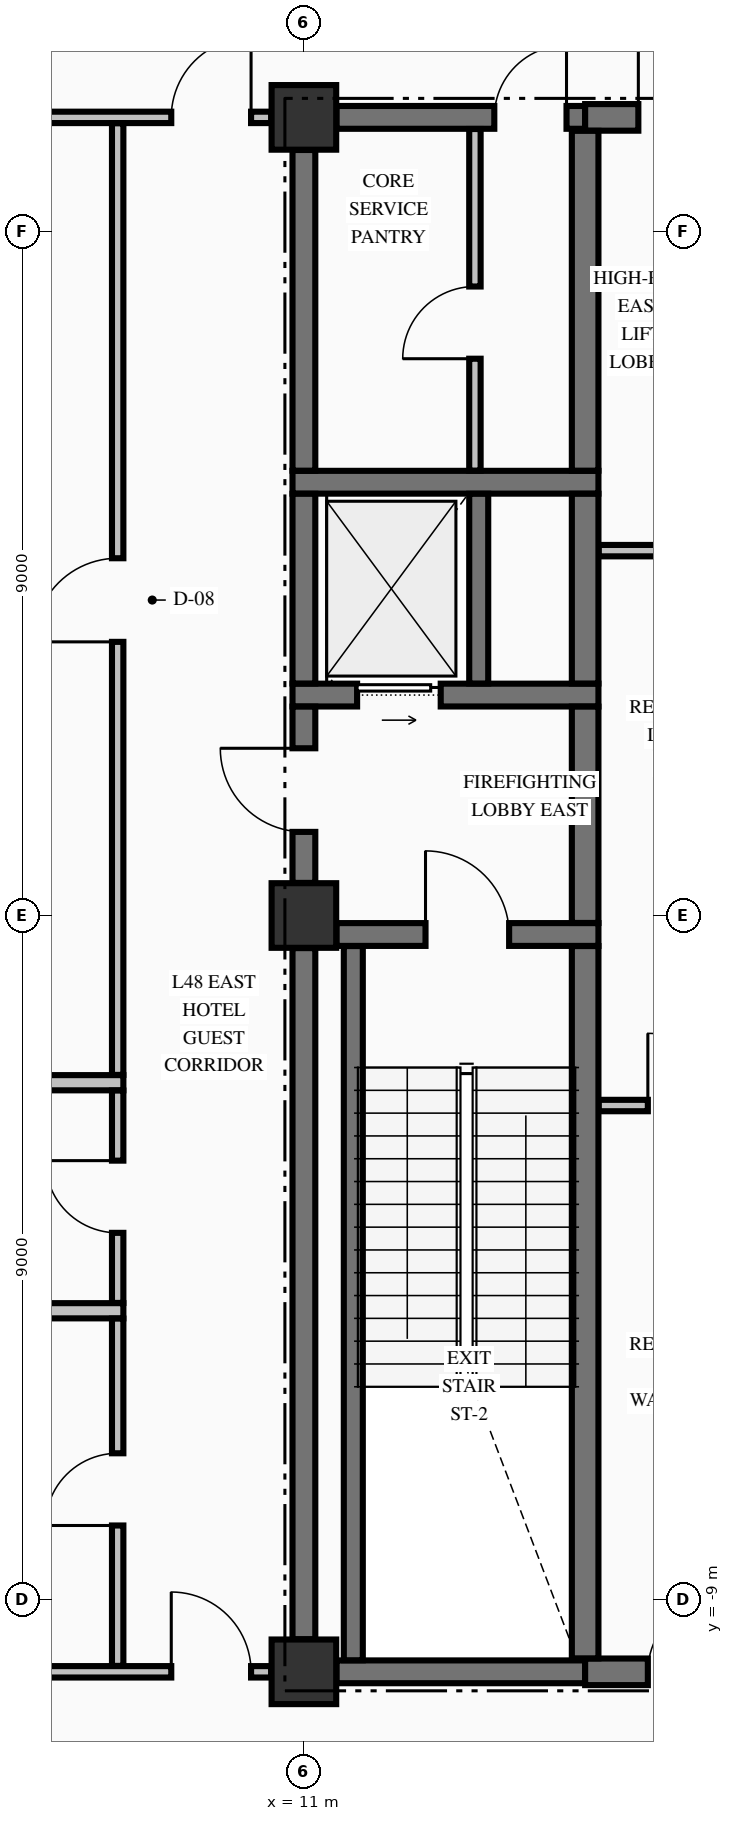
"""IFC4 building model, lengths in metres.
Left out: names, types, materials, properties, quantities, classifications, styles, units other than length and angle.
Written with IfcOpenShell. Run it as: python <this file> out.ifc"""

import sys

from ifc_helpers import new_model, si_unit, direction, frame, frame_2d, origin, origin_2d, place, context, subcontext, project, spatial, rectangle, extrude, element, fill, save


model = new_model("IFC4")
c1 = context("Model", 3, precision=1e-05, world=origin(), true_north=direction((0.0, 1.0)))
c2 = subcontext(c1, "Body", "Model", "MODEL_VIEW")
j1 = project(units=[si_unit("LENGTHUNIT", "METRE"), si_unit("PLANEANGLEUNIT", "RADIAN")], contexts=[c1])
p1 = place(None, origin())
s1 = spatial("IfcSite", under=j1, at=p1, CompositionType="ELEMENT")
p2 = place(p1, origin())
s2 = spatial("IfcBuilding", under=s1, at=p2, CompositionType="ELEMENT")
p3 = place(p2, frame((0.0, 0.0, 186.46)))
s3 = spatial("IfcBuildingStorey", under=s2, at=p3, CompositionType="ELEMENT", Elevation=186.46)
for number, where, z_axis, x_axis in (
    (1, (11.0, -9.95, -0.425), (0.0, 0.0, 1.0), (1.0, 0.0, 0.0)),
    (2, (11.0, 0.0, -0.425), (0.0, 0.0, 1.0), (1.0, 0.0, 0.0)),
    (3, (11.0, 10.5, -0.425), (0.0, 0.0, 1.0), (1.0, 0.0, 0.0)),
):
    element("IfcColumn", number, at=place(p3, frame(where, z_axis=z_axis, x_axis=x_axis)), inside=s3, PredefinedType="COLUMN", context=c2, shape_type="SweptSolid", body=[
        extrude(rectangle(XDim=0.85, YDim=0.85, at=origin_2d()), origin(), (0.0, 0.0, 1.0), 5.0),
    ])
p4 = place(p3, frame((11.429, -9.95, 0.0), z_axis=(0.0, 0.0, 1.0), x_axis=(1.0, 0.0, 0.0)))
e4 = element("IfcWall", 4, at=p4, inside=s3, PredefinedType="SHEAR", context=c2, shape_type="SweptSolid", body=[
    extrude(rectangle(XDim=3.271, YDim=0.3, at=frame_2d((1.635, 0.0))), origin(), (0.0, 0.0, 1.0), 4.575),
])
p5 = place(p3, frame((14.7, -9.95, 0.0), z_axis=(0.0, 0.0, 1.0), x_axis=(1.0, 0.0, 0.0)))
e5 = element("IfcWall", 5, at=p5, inside=s3, PredefinedType="SHEAR", context=c2, shape_type="SweptSolid", body=[
    extrude(rectangle(XDim=4.871, YDim=0.35, at=frame_2d((2.436, 0.0))), origin(), (0.0, 0.0, 1.0), 4.575),
])
p6 = place(p5, frame((0.825, 0.0, 0.0)))
e6 = element("IfcOpeningElement", 6, at=p6, cuts=e5, PredefinedType="OPENING", context=c2, shape_type="SweptSolid", body=[
    extrude(rectangle(XDim=0.95, YDim=2.15, at=frame_2d((0.475, 1.075))), frame((0.0, 0.185, 0.0), z_axis=(0.0, -1.0, 0.0), x_axis=(1.0, 0.0, 0.0)), (0.0, 0.0, 1.0), 0.37),
])
p7 = place(p5, frame((3.375, 0.0, 0.0)))
e7 = element("IfcOpeningElement", 7, at=p7, cuts=e5, PredefinedType="OPENING", context=c2, shape_type="SweptSolid", body=[
    extrude(rectangle(XDim=0.95, YDim=2.15, at=frame_2d((0.475, 1.075))), frame((0.0, 0.185, 0.0), z_axis=(0.0, -1.0, 0.0), x_axis=(1.0, 0.0, 0.0)), (0.0, 0.0, 1.0), 0.37),
])
p8 = place(p3, frame((11.429, -0.25, 0.0), z_axis=(0.0, 0.0, 1.0), x_axis=(1.0, 0.0, 0.0)))
e8 = element("IfcWall", 8, at=p8, inside=s3, PredefinedType="SHEAR", context=c2, shape_type="SweptSolid", body=[
    extrude(rectangle(XDim=3.446, YDim=0.3, at=frame_2d((1.723, 0.0))), origin(), (0.0, 0.0, 1.0), 4.575),
])
p9 = place(p8, frame((1.171, 0.0, 0.0)))
e9 = element("IfcOpeningElement", 9, at=p9, cuts=e8, PredefinedType="OPENING", context=c2, shape_type="SweptSolid", body=[
    extrude(rectangle(XDim=1.1, YDim=2.15, at=frame_2d((0.55, 1.075))), frame((0.0, 0.16, 0.0), z_axis=(0.0, -1.0, 0.0), x_axis=(1.0, 0.0, 0.0)), (0.0, 0.0, 1.0), 0.32),
])
p10 = place(p3, frame((10.85, 2.9, 0.0), z_axis=(0.0, 0.0, 1.0), x_axis=(1.0, 0.0, 0.0)))
e10 = element("IfcWall", 10, at=p10, inside=s3, PredefinedType="SHEAR", context=c2, shape_type="SweptSolid", body=[
    extrude(rectangle(XDim=4.025, YDim=0.3, at=frame_2d((2.012, 0.0))), origin(), (0.0, 0.0, 1.0), 4.575),
])
p11 = place(p10, frame((0.85, 0.0, 0.0)))
e11 = element("IfcOpeningElement", 11, at=p11, cuts=e10, PredefinedType="OPENING", context=c2, shape_type="SweptSolid", body=[
    extrude(rectangle(XDim=1.1, YDim=2.2, at=frame_2d((0.55, 1.1))), frame((0.0, 0.16, 0.0), z_axis=(0.0, -1.0, 0.0), x_axis=(1.0, 0.0, 0.0)), (0.0, 0.0, 1.0), 0.32),
])
p12 = place(p3, frame((10.85, 5.7, 0.0), z_axis=(0.0, 0.0, 1.0), x_axis=(1.0, 0.0, 0.0)))
e12 = element("IfcWall", 12, at=p12, inside=s3, PredefinedType="SHEAR", context=c2, shape_type="SweptSolid", body=[
    extrude(rectangle(XDim=4.025, YDim=0.3, at=frame_2d((2.012, 0.0))), origin(), (0.0, 0.0, 1.0), 4.575),
])
p13 = place(p3, frame((11.429, 10.5, 0.0), z_axis=(0.0, 0.0, 1.0), x_axis=(1.0, 0.0, 0.0)))
e13 = element("IfcWall", 13, at=p13, inside=s3, PredefinedType="SHEAR", context=c2, shape_type="SweptSolid", body=[
    extrude(rectangle(XDim=3.271, YDim=0.3, at=frame_2d((1.635, 0.0))), origin(), (0.0, 0.0, 1.0), 4.575),
])
p14 = place(p13, frame((2.076, 0.0, 0.0)))
e14 = element("IfcOpeningElement", 14, at=p14, cuts=e13, PredefinedType="OPENING", context=c2, shape_type="SweptSolid", body=[
    extrude(rectangle(XDim=0.95, YDim=2.15, at=frame_2d((0.475, 1.075))), frame((0.0, 0.16, 0.0), z_axis=(0.0, -1.0, 0.0), x_axis=(1.0, 0.0, 0.0)), (0.0, 0.0, 1.0), 0.32),
])
p15 = place(p3, frame((14.7, 10.5, 0.0), z_axis=(0.0, 0.0, 1.0), x_axis=(1.0, 0.0, 0.0)))
e15 = element("IfcWall", 15, at=p15, inside=s3, PredefinedType="SHEAR", context=c2, shape_type="SweptSolid", body=[
    extrude(rectangle(XDim=4.871, YDim=0.35, at=frame_2d((2.436, 0.0))), origin(), (0.0, 0.0, 1.0), 4.575),
])
p16 = place(p15, frame((0.7, 0.0, 0.0)))
e16 = element("IfcOpeningElement", 16, at=p16, cuts=e15, PredefinedType="OPENING", context=c2, shape_type="SweptSolid", body=[
    extrude(rectangle(XDim=1.1, YDim=2.15, at=frame_2d((0.55, 1.075))), frame((0.0, 0.185, 0.0), z_axis=(0.0, -1.0, 0.0), x_axis=(1.0, 0.0, 0.0)), (0.0, 0.0, 1.0), 0.37),
])
p17 = place(p3, frame((-10.569, -9.95, 0.0), z_axis=(0.0, 0.0, 1.0), x_axis=(1.0, 0.0, 0.0)))
e17 = element("IfcWall", 17, at=p17, inside=s3, PredefinedType="PARTITIONING", context=c2, shape_type="SweptSolid", body=[
    extrude(rectangle(XDim=21.138, YDim=0.15, at=frame_2d((10.569, 0.0))), origin(), (0.0, 0.0, 1.0), 4.575),
])
p18 = place(p17, frame((0.264, 0.0, 0.0)))
e18 = element("IfcOpeningElement", 18, at=p18, cuts=e17, PredefinedType="OPENING", context=c2, shape_type="SweptSolid", body=[
    extrude(rectangle(XDim=1.05, YDim=2.15, at=frame_2d((0.525, 1.075))), frame((0.0, 0.085, 0.0), z_axis=(0.0, -1.0, 0.0), x_axis=(1.0, 0.0, 0.0)), (0.0, 0.0, 1.0), 0.17),
])
p19 = place(p17, frame((19.824, 0.0, 0.0)))
e19 = element("IfcOpeningElement", 19, at=p19, cuts=e17, PredefinedType="OPENING", context=c2, shape_type="SweptSolid", body=[
    extrude(rectangle(XDim=1.05, YDim=2.15, at=frame_2d((0.525, 1.075))), frame((0.0, 0.085, 0.0), z_axis=(0.0, -1.0, 0.0), x_axis=(1.0, 0.0, 0.0)), (0.0, 0.0, 1.0), 0.17),
])
p20 = place(p17, frame((12.874, 0.0, 0.0)))
e20 = element("IfcOpeningElement", 20, at=p20, cuts=e17, PredefinedType="OPENING", context=c2, shape_type="SweptSolid", body=[
    extrude(rectangle(XDim=0.95, YDim=2.15, at=frame_2d((0.475, 1.075))), frame((0.0, 0.085, 0.0), z_axis=(0.0, -1.0, 0.0), x_axis=(1.0, 0.0, 0.0)), (0.0, 0.0, 1.0), 0.17),
])
p21 = place(p3, frame((-0.1, -5.2, 0.0), z_axis=(0.0, 0.0, 1.0), x_axis=(1.0, 0.0, 0.0)))
e21 = element("IfcWall", 21, at=p21, inside=s3, PredefinedType="PARTITIONING", context=c2, shape_type="SweptSolid", body=[
    extrude(rectangle(XDim=8.725, YDim=0.2, at=frame_2d((4.363, 0.0))), origin(), (0.0, 0.0, 1.0), 4.575),
])
p22 = place(p3, frame((14.878, -2.5, 0.0), z_axis=(0.0, 0.0, 1.0), x_axis=(1.0, 0.0, 0.0)))
e22 = element("IfcWall", 22, at=p22, inside=s3, PredefinedType="PARTITIONING", context=c2, shape_type="SweptSolid", body=[
    extrude(rectangle(XDim=4.944, YDim=0.15, at=frame_2d((2.472, 0.0))), origin(), (0.0, 0.0, 1.0), 4.575),
])
p23 = place(p22, frame((0.647, 0.0, 0.0)))
e23 = element("IfcOpeningElement", 23, at=p23, cuts=e22, PredefinedType="OPENING", context=c2, shape_type="SweptSolid", body=[
    extrude(rectangle(XDim=0.95, YDim=2.15, at=frame_2d((0.475, 1.075))), frame((0.0, 0.085, 0.0), z_axis=(0.0, -1.0, 0.0), x_axis=(1.0, 0.0, 0.0)), (0.0, 0.0, 1.0), 0.17),
])
p24 = place(p22, frame((3.197, 0.0, 0.0)))
e24 = element("IfcOpeningElement", 24, at=p24, cuts=e22, PredefinedType="OPENING", context=c2, shape_type="SweptSolid", body=[
    extrude(rectangle(XDim=0.95, YDim=2.15, at=frame_2d((0.475, 1.075))), frame((0.0, 0.085, 0.0), z_axis=(0.0, -1.0, 0.0), x_axis=(1.0, 0.0, 0.0)), (0.0, 0.0, 1.0), 0.17),
])
p25 = place(p3, frame((-0.1, -2.2, 0.0), z_axis=(0.0, 0.0, 1.0), x_axis=(1.0, 0.0, 0.0)))
e25 = element("IfcWall", 25, at=p25, inside=s3, PredefinedType="PARTITIONING", context=c2, shape_type="SweptSolid", body=[
    extrude(rectangle(XDim=8.725, YDim=0.2, at=frame_2d((4.363, 0.0))), origin(), (0.0, 0.0, 1.0), 4.575),
])
p26 = place(p3, frame((14.878, 4.8, 0.0), z_axis=(0.0, 0.0, 1.0), x_axis=(1.0, 0.0, 0.0)))
e26 = element("IfcWall", 26, at=p26, inside=s3, PredefinedType="PARTITIONING", context=c2, shape_type="SweptSolid", body=[
    extrude(rectangle(XDim=4.944, YDim=0.15, at=frame_2d((2.472, 0.0))), origin(), (0.0, 0.0, 1.0), 4.575),
])
p27 = place(p3, frame((-10.569, 10.5, 0.0), z_axis=(0.0, 0.0, 1.0), x_axis=(1.0, 0.0, 0.0)))
e27 = element("IfcWall", 27, at=p27, inside=s3, PredefinedType="PARTITIONING", context=c2, shape_type="SweptSolid", body=[
    extrude(rectangle(XDim=21.138, YDim=0.15, at=frame_2d((10.569, 0.0))), origin(), (0.0, 0.0, 1.0), 4.575),
])
p28 = place(p27, frame((0.264, 0.0, 0.0)))
e28 = element("IfcOpeningElement", 28, at=p28, cuts=e27, PredefinedType="OPENING", context=c2, shape_type="SweptSolid", body=[
    extrude(rectangle(XDim=1.05, YDim=2.15, at=frame_2d((0.525, 1.075))), frame((0.0, 0.085, 0.0), z_axis=(0.0, -1.0, 0.0), x_axis=(1.0, 0.0, 0.0)), (0.0, 0.0, 1.0), 0.17),
])
p29 = place(p27, frame((19.824, 0.0, 0.0)))
e29 = element("IfcOpeningElement", 29, at=p29, cuts=e27, PredefinedType="OPENING", context=c2, shape_type="SweptSolid", body=[
    extrude(rectangle(XDim=1.05, YDim=2.15, at=frame_2d((0.525, 1.075))), frame((0.0, 0.085, 0.0), z_axis=(0.0, -1.0, 0.0), x_axis=(1.0, 0.0, 0.0)), (0.0, 0.0, 1.0), 0.17),
])
p30 = place(p3, frame((11.0, -9.521, 0.0), z_axis=(0.0, 0.0, 1.0), x_axis=(0.0, 1.0, 0.0)))
e30 = element("IfcWall", 30, at=p30, inside=s3, PredefinedType="SHEAR", context=c2, shape_type="SweptSolid", body=[
    extrude(rectangle(XDim=9.092, YDim=0.3, at=frame_2d((4.546, 0.0))), origin(), (0.0, 0.0, 1.0), 4.575),
])
p31 = place(p3, frame((11.0, 0.429, 0.0), z_axis=(0.0, 0.0, 1.0), x_axis=(0.0, 1.0, 0.0)))
e31 = element("IfcWall", 31, at=p31, inside=s3, PredefinedType="SHEAR", context=c2, shape_type="SweptSolid", body=[
    extrude(rectangle(XDim=2.319, YDim=0.3, at=frame_2d((1.16, 0.0))), origin(), (0.0, 0.0, 1.0), 4.575),
])
p32 = place(p31, frame((0.671, 0.0, 0.0)))
e32 = element("IfcOpeningElement", 32, at=p32, cuts=e31, PredefinedType="OPENING", context=c2, shape_type="SweptSolid", body=[
    extrude(rectangle(XDim=1.1, YDim=2.15, at=frame_2d((0.55, 1.075))), frame((0.0, 0.16, 0.0), z_axis=(0.0, -1.0, 0.0), x_axis=(1.0, 0.0, 0.0)), (0.0, 0.0, 1.0), 0.32),
])
p33 = place(p3, frame((11.0, 3.052, 0.0), z_axis=(0.0, 0.0, 1.0), x_axis=(0.0, 1.0, 0.0)))
e33 = element("IfcWall", 33, at=p33, inside=s3, PredefinedType="SHEAR", context=c2, shape_type="SweptSolid", body=[
    extrude(rectangle(XDim=2.496, YDim=0.3, at=frame_2d((1.248, 0.0))), origin(), (0.0, 0.0, 1.0), 4.575),
])
p34 = place(p3, frame((11.0, 5.852, 0.0), z_axis=(0.0, 0.0, 1.0), x_axis=(0.0, 1.0, 0.0)))
e34 = element("IfcWall", 34, at=p34, inside=s3, PredefinedType="SHEAR", context=c2, shape_type="SweptSolid", body=[
    extrude(rectangle(XDim=4.219, YDim=0.3, at=frame_2d((2.109, 0.0))), origin(), (0.0, 0.0, 1.0), 4.575),
])
p35 = place(p3, frame((11.65, -9.798, 0.0), z_axis=(0.0, 0.0, 1.0), x_axis=(0.0, 1.0, 0.0)))
e35 = element("IfcWall", 35, at=p35, inside=s3, PredefinedType="SOLIDWALL", context=c2, shape_type="SweptSolid", body=[
    extrude(rectangle(XDim=9.396, YDim=0.25, at=frame_2d((4.698, 0.0))), origin(), (0.0, 0.0, 1.0), 4.575),
])
p36 = place(p3, frame((13.3, 3.052, 0.0), z_axis=(0.0, 0.0, 1.0), x_axis=(0.0, 1.0, 0.0)))
e36 = element("IfcWall", 36, at=p36, inside=s3, PredefinedType="SOLIDWALL", context=c2, shape_type="SweptSolid", body=[
    extrude(rectangle(XDim=2.496, YDim=0.25, at=frame_2d((1.248, 0.0))), origin(), (0.0, 0.0, 1.0), 4.575),
])
p37 = place(p3, frame((14.7, -9.773, 0.0), z_axis=(0.0, 0.0, 1.0), x_axis=(0.0, 1.0, 0.0)))
e37 = element("IfcWall", 37, at=p37, inside=s3, PredefinedType="SHEAR", context=c2, shape_type="SweptSolid", body=[
    extrude(rectangle(XDim=9.371, YDim=0.35, at=frame_2d((4.686, 0.0))), origin(), (0.0, 0.0, 1.0), 4.575),
])
p38 = place(p3, frame((14.7, -0.098, 0.0), z_axis=(0.0, 0.0, 1.0), x_axis=(0.0, 1.0, 0.0)))
e38 = element("IfcWall", 38, at=p38, inside=s3, PredefinedType="SHEAR", context=c2, shape_type="SweptSolid", body=[
    extrude(rectangle(XDim=2.846, YDim=0.35, at=frame_2d((1.423, 0.0))), origin(), (0.0, 0.0, 1.0), 4.575),
])
p39 = place(p3, frame((14.7, 3.052, 0.0), z_axis=(0.0, 0.0, 1.0), x_axis=(0.0, 1.0, 0.0)))
e39 = element("IfcWall", 39, at=p39, inside=s3, PredefinedType="SHEAR", context=c2, shape_type="SweptSolid", body=[
    extrude(rectangle(XDim=2.496, YDim=0.35, at=frame_2d((1.248, 0.0))), origin(), (0.0, 0.0, 1.0), 4.575),
])
p40 = place(p3, frame((14.7, 5.852, 0.0), z_axis=(0.0, 0.0, 1.0), x_axis=(0.0, 1.0, 0.0)))
e40 = element("IfcWall", 40, at=p40, inside=s3, PredefinedType="SHEAR", context=c2, shape_type="SweptSolid", body=[
    extrude(rectangle(XDim=4.471, YDim=0.35, at=frame_2d((2.235, 0.0))), origin(), (0.0, 0.0, 1.0), 4.575),
])
p41 = place(p3, frame((8.55, -9.872, 0.0), z_axis=(0.0, 0.0, 1.0), x_axis=(0.0, 1.0, 0.0)))
e41 = element("IfcWall", 41, at=p41, inside=s3, PredefinedType="PARTITIONING", context=c2, shape_type="SweptSolid", body=[
    extrude(rectangle(XDim=4.569, YDim=0.15, at=frame_2d((2.285, 0.0))), origin(), (0.0, 0.0, 1.0), 4.575),
])
p42 = place(p41, frame((1.847, 0.0, 0.0)))
e42 = element("IfcOpeningElement", 42, at=p42, cuts=e41, PredefinedType="OPENING", context=c2, shape_type="SweptSolid", body=[
    extrude(rectangle(XDim=0.95, YDim=2.15, at=frame_2d((0.475, 1.075))), frame((0.0, 0.085, 0.0), z_axis=(0.0, -1.0, 0.0), x_axis=(1.0, 0.0, 0.0)), (0.0, 0.0, 1.0), 0.17),
])
p43 = place(p3, frame((8.55, -5.097, 0.0), z_axis=(0.0, 0.0, 1.0), x_axis=(0.0, 1.0, 0.0)))
e43 = element("IfcWall", 43, at=p43, inside=s3, PredefinedType="PARTITIONING", context=c2, shape_type="SweptSolid", body=[
    extrude(rectangle(XDim=2.794, YDim=0.15, at=frame_2d((1.397, 0.0))), origin(), (0.0, 0.0, 1.0), 4.575),
])
p44 = place(p43, frame((0.922, 0.0, 0.0)))
e44 = element("IfcOpeningElement", 44, at=p44, cuts=e43, PredefinedType="OPENING", context=c2, shape_type="SweptSolid", body=[
    extrude(rectangle(XDim=0.95, YDim=2.15, at=frame_2d((0.475, 1.075))), frame((0.0, 0.085, 0.0), z_axis=(0.0, -1.0, 0.0), x_axis=(1.0, 0.0, 0.0)), (0.0, 0.0, 1.0), 0.17),
])
p45 = place(p3, frame((8.55, -2.097, 0.0), z_axis=(0.0, 0.0, 1.0), x_axis=(0.0, 1.0, 0.0)))
e45 = element("IfcWall", 45, at=p45, inside=s3, PredefinedType="PARTITIONING", context=c2, shape_type="SweptSolid", body=[
    extrude(rectangle(XDim=12.519, YDim=0.15, at=frame_2d((6.26, 0.0))), origin(), (0.0, 0.0, 1.0), 4.575),
])
p46 = place(p45, frame((5.697, 0.0, 0.0)))
e46 = element("IfcOpeningElement", 46, at=p46, cuts=e45, PredefinedType="OPENING", context=c2, shape_type="SweptSolid", body=[
    extrude(rectangle(XDim=1.1, YDim=2.15, at=frame_2d((0.55, 1.075))), frame((0.0, 0.085, 0.0), z_axis=(0.0, -1.0, 0.0), x_axis=(1.0, 0.0, 0.0)), (0.0, 0.0, 1.0), 0.17),
])
p47 = place(p3, frame((13.25, 5.853, 0.0), z_axis=(0.0, 0.0, 1.0), x_axis=(0.0, 1.0, 0.0)))
e47 = element("IfcWall", 47, at=p47, inside=s3, PredefinedType="PARTITIONING", context=c2, shape_type="SweptSolid", body=[
    extrude(rectangle(XDim=4.494, YDim=0.15, at=frame_2d((2.247, 0.0))), origin(), (0.0, 0.0, 1.0), 4.575),
])
p48 = place(p47, frame((1.472, 0.0, 0.0)))
e48 = element("IfcOpeningElement", 48, at=p48, cuts=e47, PredefinedType="OPENING", context=c2, shape_type="SweptSolid", body=[
    extrude(rectangle(XDim=0.95, YDim=2.15, at=frame_2d((0.475, 1.075))), frame((0.0, 0.085, 0.0), z_axis=(0.0, -1.0, 0.0), x_axis=(1.0, 0.0, 0.0)), (0.0, 0.0, 1.0), 0.17),
])
p49 = place(p9, origin())
e49 = element("IfcDoor", 49, at=p49, inside=s3, OperationType="SINGLE_SWING_LEFT", PredefinedType="DOOR", context=c2, shape_type="SweptSolid", body=[
    extrude(rectangle(XDim=1.1, YDim=2.15, at=frame_2d((0.55, 1.075))), frame((0.0, 0.025, 0.0), z_axis=(0.0, -1.0, 0.0), x_axis=(1.0, 0.0, 0.0)), (0.0, 0.0, 1.0), 0.05),
])
fill(e9, e49)
p50 = place(p32, origin())
e50 = element("IfcDoor", 50, at=p50, inside=s3, OperationType="SINGLE_SWING_RIGHT", PredefinedType="DOOR", context=c2, shape_type="SweptSolid", body=[
    extrude(rectangle(XDim=1.1, YDim=2.15, at=frame_2d((0.55, 1.075))), frame((0.0, 0.025, 0.0), z_axis=(0.0, -1.0, 0.0), x_axis=(1.0, 0.0, 0.0)), (0.0, 0.0, 1.0), 0.05),
])
fill(e32, e50)
p51 = place(p11, origin())
e51 = element("IfcDoor", 51, at=p51, inside=s3, OperationType="SLIDING_TO_RIGHT", PredefinedType="DOOR", context=c2, shape_type="SweptSolid", body=[
    extrude(rectangle(XDim=1.1, YDim=2.2, at=frame_2d((0.55, 1.1))), frame((0.0, 0.025, 0.0), z_axis=(0.0, -1.0, 0.0), x_axis=(1.0, 0.0, 0.0)), (0.0, 0.0, 1.0), 0.05),
])
fill(e11, e51)
p52 = place(p14, origin())
e52 = element("IfcDoor", 52, at=p52, inside=s3, OperationType="SINGLE_SWING_RIGHT", PredefinedType="DOOR", context=c2, shape_type="SweptSolid", body=[
    extrude(rectangle(XDim=0.95, YDim=2.15, at=frame_2d((0.475, 1.075))), frame((0.0, 0.025, 0.0), z_axis=(0.0, -1.0, 0.0), x_axis=(1.0, 0.0, 0.0)), (0.0, 0.0, 1.0), 0.05),
])
fill(e14, e52)
p53 = place(p48, origin())
e53 = element("IfcDoor", 53, at=p53, inside=s3, OperationType="SINGLE_SWING_LEFT", PredefinedType="DOOR", context=c2, shape_type="SweptSolid", body=[
    extrude(rectangle(XDim=0.95, YDim=2.15, at=frame_2d((0.475, 1.075))), frame((0.0, 0.025, 0.0), z_axis=(0.0, -1.0, 0.0), x_axis=(1.0, 0.0, 0.0)), (0.0, 0.0, 1.0), 0.05),
])
fill(e48, e53)
p54 = place(p16, origin())
e54 = element("IfcDoor", 54, at=p54, inside=s3, OperationType="SINGLE_SWING_LEFT", PredefinedType="DOOR", context=c2, shape_type="SweptSolid", body=[
    extrude(rectangle(XDim=1.1, YDim=2.15, at=frame_2d((0.55, 1.075))), frame((0.0, 0.025, 0.0), z_axis=(0.0, -1.0, 0.0), x_axis=(1.0, 0.0, 0.0)), (0.0, 0.0, 1.0), 0.05),
])
fill(e16, e54)
p55 = place(p6, origin())
e55 = element("IfcDoor", 55, at=p55, inside=s3, OperationType="SINGLE_SWING_RIGHT", PredefinedType="DOOR", context=c2, shape_type="SweptSolid", body=[
    extrude(rectangle(XDim=0.95, YDim=2.15, at=frame_2d((0.475, 1.075))), frame((0.0, 0.025, 0.0), z_axis=(0.0, -1.0, 0.0), x_axis=(1.0, 0.0, 0.0)), (0.0, 0.0, 1.0), 0.05),
])
fill(e6, e55)
p56 = place(p23, origin())
e56 = element("IfcDoor", 56, at=p56, inside=s3, OperationType="SINGLE_SWING_LEFT", PredefinedType="DOOR", context=c2, shape_type="SweptSolid", body=[
    extrude(rectangle(XDim=0.95, YDim=2.15, at=frame_2d((0.475, 1.075))), frame((0.0, 0.025, 0.0), z_axis=(0.0, -1.0, 0.0), x_axis=(1.0, 0.0, 0.0)), (0.0, 0.0, 1.0), 0.05),
])
fill(e23, e56)
p57 = place(p29, origin())
e57 = element("IfcDoor", 57, at=p57, inside=s3, OperationType="SINGLE_SWING_RIGHT", PredefinedType="DOOR", context=c2, shape_type="SweptSolid", body=[
    extrude(rectangle(XDim=1.05, YDim=2.15, at=frame_2d((0.525, 1.075))), frame((0.0, 0.025, 0.0), z_axis=(0.0, -1.0, 0.0), x_axis=(1.0, 0.0, 0.0)), (0.0, 0.0, 1.0), 0.05),
])
fill(e29, e57)
p58 = place(p19, origin())
e58 = element("IfcDoor", 58, at=p58, inside=s3, OperationType="SINGLE_SWING_LEFT", PredefinedType="DOOR", context=c2, shape_type="SweptSolid", body=[
    extrude(rectangle(XDim=1.05, YDim=2.15, at=frame_2d((0.525, 1.075))), frame((0.0, 0.025, 0.0), z_axis=(0.0, -1.0, 0.0), x_axis=(1.0, 0.0, 0.0)), (0.0, 0.0, 1.0), 0.05),
])
fill(e19, e58)
p59 = place(p46, origin())
e59 = element("IfcDoor", 59, at=p59, inside=s3, OperationType="SINGLE_SWING_LEFT", PredefinedType="DOOR", context=c2, shape_type="SweptSolid", body=[
    extrude(rectangle(XDim=1.1, YDim=2.15, at=frame_2d((0.55, 1.075))), frame((0.0, 0.025, 0.0), z_axis=(0.0, -1.0, 0.0), x_axis=(1.0, 0.0, 0.0)), (0.0, 0.0, 1.0), 0.05),
])
fill(e46, e59)
p60 = place(p44, origin())
e60 = element("IfcDoor", 60, at=p60, inside=s3, OperationType="SINGLE_SWING_RIGHT", PredefinedType="DOOR", context=c2, shape_type="SweptSolid", body=[
    extrude(rectangle(XDim=0.95, YDim=2.15, at=frame_2d((0.475, 1.075))), frame((0.0, 0.025, 0.0), z_axis=(0.0, -1.0, 0.0), x_axis=(1.0, 0.0, 0.0)), (0.0, 0.0, 1.0), 0.05),
])
fill(e44, e60)
p61 = place(p42, origin())
e61 = element("IfcDoor", 61, at=p61, inside=s3, OperationType="SINGLE_SWING_LEFT", PredefinedType="DOOR", context=c2, shape_type="SweptSolid", body=[
    extrude(rectangle(XDim=0.95, YDim=2.15, at=frame_2d((0.475, 1.075))), frame((0.0, 0.025, 0.0), z_axis=(0.0, -1.0, 0.0), x_axis=(1.0, 0.0, 0.0)), (0.0, 0.0, 1.0), 0.05),
])
fill(e42, e61)
save(model, sys.argv[1])
